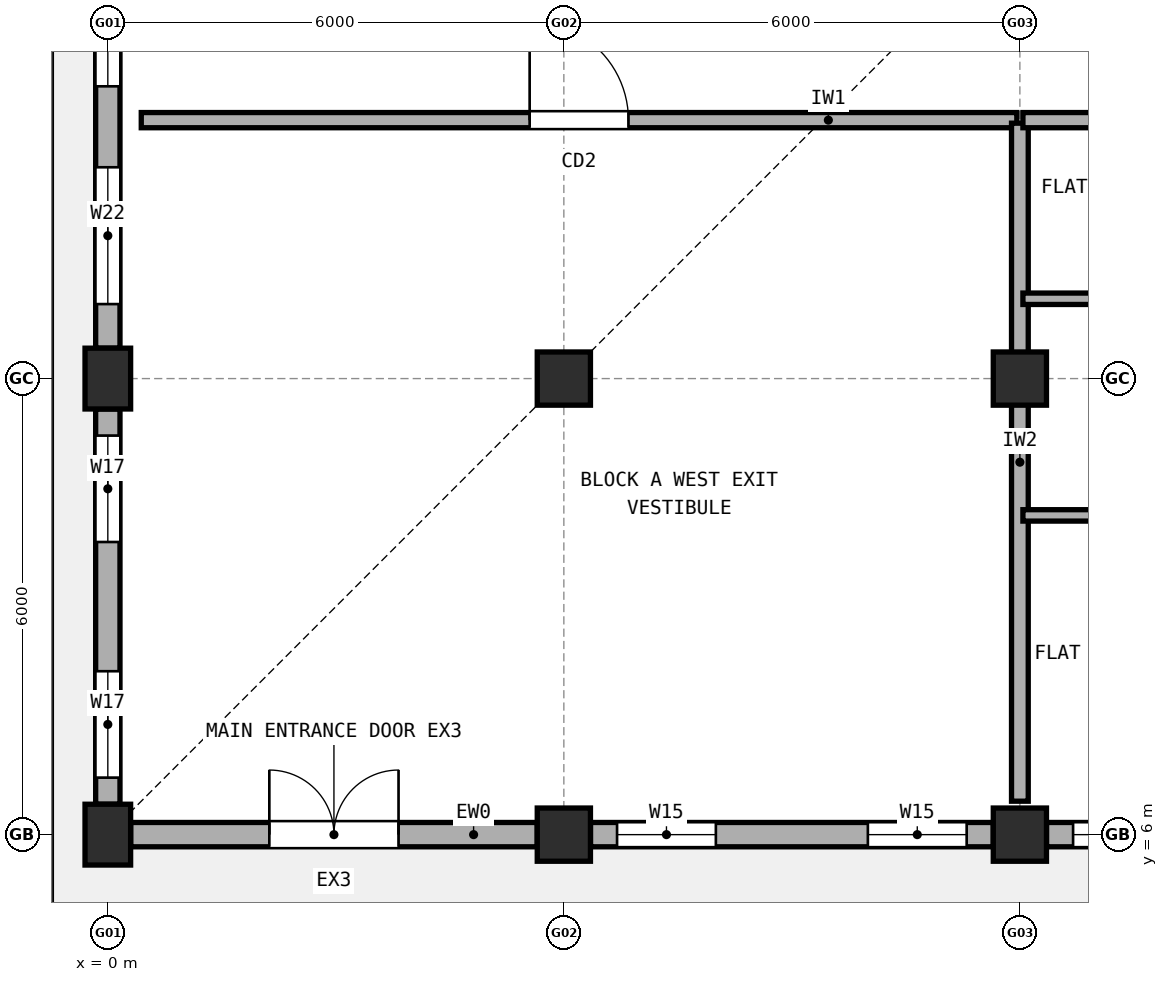
"""IFC4 building model, lengths in metres.
Left out: names, types, materials, properties, quantities, classifications, styles, units other than length and angle.
Written with IfcOpenShell. Run it as: python <this file> out.ifc"""

import sys

from ifc_helpers import new_model, si_unit, direction, frame, frame_2d, origin, origin_2d, place, context, subcontext, project, spatial, rectangle, extrude, element, fill, save


model = new_model("IFC4")
c1 = context("Model", 3, precision=1e-05, world=origin(), true_north=direction((0.0, 1.0)))
c2 = subcontext(c1, "Body", "Model", "MODEL_VIEW")
j1 = project(units=[si_unit("LENGTHUNIT", "METRE"), si_unit("PLANEANGLEUNIT", "RADIAN")], contexts=[c1])
p1 = place(None, origin())
s1 = spatial("IfcSite", under=j1, at=p1, CompositionType="ELEMENT")
p2 = place(p1, origin())
s2 = spatial("IfcBuilding", under=s1, at=p2, CompositionType="ELEMENT")
p3 = place(p2, origin())
s3 = spatial("IfcBuildingStorey", under=s2, at=p3, CompositionType="ELEMENT", Elevation=0.0)
for number, where, z_axis, x_axis in (
    (1, (0.0, 6.0, 0.0), (0.0, 0.0, 1.0), (1.0, 0.0, 0.0)),
    (2, (0.0, 12.0, 0.0), (0.0, 0.0, 1.0), (1.0, 0.0, 0.0)),
):
    element("IfcColumn", number, at=place(p3, frame(where, z_axis=z_axis, x_axis=x_axis)), inside=s3, PredefinedType="COLUMN", context=c2, shape_type="SweptSolid", body=[
        extrude(rectangle(XDim=0.6, YDim=0.8, at=origin_2d()), origin(), (0.0, 0.0, 1.0), 4.23),
    ])
for number, where, z_axis, x_axis in (
    (3, (6.0, 6.0, 0.0), (0.0, 0.0, 1.0), (1.0, 0.0, 0.0)),
    (4, (6.0, 12.0, 0.0), (0.0, 0.0, 1.0), (1.0, 0.0, 0.0)),
    (5, (12.0, 6.0, 0.0), (0.0, 0.0, 1.0), (1.0, 0.0, 0.0)),
    (6, (12.0, 12.0, 0.0), (0.0, 0.0, 1.0), (1.0, 0.0, 0.0)),
):
    element("IfcColumn", number, at=place(p3, frame(where, z_axis=z_axis, x_axis=x_axis)), inside=s3, PredefinedType="COLUMN", context=c2, shape_type="SweptSolid", body=[
        extrude(rectangle(XDim=0.7, YDim=0.7, at=origin_2d()), origin(), (0.0, 0.0, 1.0), 4.23),
    ])
p4 = place(p3, frame((0.3, 6.0, 0.0), z_axis=(0.0, 0.0, 1.0), x_axis=(1.0, 0.0, 0.0)))
e7 = element("IfcWall", 7, at=p4, inside=s3, PredefinedType="STANDARD", context=c2, shape_type="SweptSolid", body=[
    extrude(rectangle(XDim=5.35, YDim=0.32, at=frame_2d((2.675, 0.0))), origin(), (0.0, 0.0, 1.0), 3.112),
])
p5 = place(p4, frame((1.825, 0.0, 0.0)))
e8 = element("IfcOpeningElement", 8, at=p5, cuts=e7, PredefinedType="OPENING", context=c2, shape_type="SweptSolid", body=[
    extrude(rectangle(XDim=1.7, YDim=2.2, at=frame_2d((0.85, 1.1))), frame((0.0, 0.17, 0.0), z_axis=(0.0, -1.0, 0.0), x_axis=(1.0, 0.0, 0.0)), (0.0, 0.0, 1.0), 0.34),
])
p6 = place(p3, frame((6.35, 6.0, 0.0), z_axis=(0.0, 0.0, 1.0), x_axis=(1.0, 0.0, 0.0)))
e9 = element("IfcWall", 9, at=p6, inside=s3, PredefinedType="STANDARD", context=c2, shape_type="SweptSolid", body=[
    extrude(rectangle(XDim=5.3, YDim=0.32, at=frame_2d((2.65, 0.0))), origin(), (0.0, 0.0, 1.0), 3.112),
])
p7 = place(p6, frame((0.35, 0.0, 0.9)))
e10 = element("IfcOpeningElement", 10, at=p7, cuts=e9, PredefinedType="OPENING", context=c2, shape_type="SweptSolid", body=[
    extrude(rectangle(XDim=1.3, YDim=1.45, at=frame_2d((0.65, 0.725))), frame((0.0, 0.17, 0.0), z_axis=(0.0, -1.0, 0.0), x_axis=(1.0, 0.0, 0.0)), (0.0, 0.0, 1.0), 0.34),
])
p8 = place(p6, frame((3.65, 0.0, 0.9)))
e11 = element("IfcOpeningElement", 11, at=p8, cuts=e9, PredefinedType="OPENING", context=c2, shape_type="SweptSolid", body=[
    extrude(rectangle(XDim=1.3, YDim=1.45, at=frame_2d((0.65, 0.725))), frame((0.0, 0.17, 0.0), z_axis=(0.0, -1.0, 0.0), x_axis=(1.0, 0.0, 0.0)), (0.0, 0.0, 1.0), 0.34),
])
p9 = place(p3, frame((12.35, 6.0, 0.0), z_axis=(0.0, 0.0, 1.0), x_axis=(1.0, 0.0, 0.0)))
e12 = element("IfcWall", 12, at=p9, inside=s3, PredefinedType="STANDARD", context=c2, shape_type="SweptSolid", body=[
    extrude(rectangle(XDim=5.3, YDim=0.32, at=frame_2d((2.65, 0.0))), origin(), (0.0, 0.0, 1.0), 3.112),
])
p10 = place(p9, frame((0.35, 0.0, 0.9)))
e13 = element("IfcOpeningElement", 13, at=p10, cuts=e12, PredefinedType="OPENING", context=c2, shape_type="SweptSolid", body=[
    extrude(rectangle(XDim=1.4, YDim=1.5, at=frame_2d((0.7, 0.75))), frame((0.0, 0.17, 0.0), z_axis=(0.0, -1.0, 0.0), x_axis=(1.0, 0.0, 0.0)), (0.0, 0.0, 1.0), 0.34),
])
p11 = place(p9, frame((2.36, 0.0, 0.9)))
e14 = element("IfcOpeningElement", 14, at=p11, cuts=e12, PredefinedType="OPENING", context=c2, shape_type="SweptSolid", body=[
    extrude(rectangle(XDim=1.4, YDim=1.5, at=frame_2d((0.7, 0.75))), frame((0.0, 0.17, 0.0), z_axis=(0.0, -1.0, 0.0), x_axis=(1.0, 0.0, 0.0)), (0.0, 0.0, 1.0), 0.34),
])
p12 = place(p3, frame((0.0, 17.6, 0.0), z_axis=(0.0, 0.0, 1.0), x_axis=(0.0, -1.0, 0.0)))
e15 = element("IfcWall", 15, at=p12, inside=s3, PredefinedType="STANDARD", context=c2, shape_type="SweptSolid", body=[
    extrude(rectangle(XDim=5.2, YDim=0.32, at=frame_2d((2.6, 0.0))), origin(), (0.0, 0.0, 1.0), 3.712),
])
p13 = place(p12, frame((0.405, 0.0, 0.9)))
e16 = element("IfcOpeningElement", 16, at=p13, cuts=e15, PredefinedType="OPENING", context=c2, shape_type="SweptSolid", body=[
    extrude(rectangle(XDim=1.35, YDim=1.5, at=frame_2d((0.675, 0.75))), frame((0.0, 0.17, 0.0), z_axis=(0.0, -1.0, 0.0), x_axis=(1.0, 0.0, 0.0)), (0.0, 0.0, 1.0), 0.34),
])
p14 = place(p12, frame((2.82, 0.0, 0.9)))
e17 = element("IfcOpeningElement", 17, at=p14, cuts=e15, PredefinedType="OPENING", context=c2, shape_type="SweptSolid", body=[
    extrude(rectangle(XDim=1.8, YDim=1.45, at=frame_2d((0.9, 0.725))), frame((0.0, 0.17, 0.0), z_axis=(0.0, -1.0, 0.0), x_axis=(1.0, 0.0, 0.0)), (0.0, 0.0, 1.0), 0.34),
])
p15 = place(p3, frame((0.0, 11.6, 0.0), z_axis=(0.0, 0.0, 1.0), x_axis=(0.0, -1.0, 0.0)))
e18 = element("IfcWall", 18, at=p15, inside=s3, PredefinedType="STANDARD", context=c2, shape_type="SweptSolid", body=[
    extrude(rectangle(XDim=5.2, YDim=0.32, at=frame_2d((2.6, 0.0))), origin(), (0.0, 0.0, 1.0), 3.712),
])
p16 = place(p15, frame((0.35, 0.0, 0.9)))
e19 = element("IfcOpeningElement", 19, at=p16, cuts=e18, PredefinedType="OPENING", context=c2, shape_type="SweptSolid", body=[
    extrude(rectangle(XDim=1.4, YDim=1.5, at=frame_2d((0.7, 0.75))), frame((0.0, 0.17, 0.0), z_axis=(0.0, -1.0, 0.0), x_axis=(1.0, 0.0, 0.0)), (0.0, 0.0, 1.0), 0.34),
])
p17 = place(p15, frame((3.45, 0.0, 0.9)))
e20 = element("IfcOpeningElement", 20, at=p17, cuts=e18, PredefinedType="OPENING", context=c2, shape_type="SweptSolid", body=[
    extrude(rectangle(XDim=1.4, YDim=1.5, at=frame_2d((0.7, 0.75))), frame((0.0, 0.17, 0.0), z_axis=(0.0, -1.0, 0.0), x_axis=(1.0, 0.0, 0.0)), (0.0, 0.0, 1.0), 0.34),
])
p18 = place(p3, frame((0.44, 15.4, 0.0), z_axis=(0.0, 0.0, 1.0), x_axis=(1.0, 0.0, 0.0)))
e21 = element("IfcWall", 21, at=p18, inside=s3, PredefinedType="SOLIDWALL", context=c2, shape_type="SweptSolid", body=[
    extrude(rectangle(XDim=11.52, YDim=0.2, at=frame_2d((5.76, 0.0))), origin(), (0.0, 0.0, 1.0), 3.612),
])
p19 = place(p18, frame((5.11, 0.0, 0.0)))
e22 = element("IfcOpeningElement", 22, at=p19, cuts=e21, PredefinedType="OPENING", context=c2, shape_type="SweptSolid", body=[
    extrude(rectangle(XDim=1.3, YDim=2.15, at=frame_2d((0.65, 1.075))), frame((0.0, 0.11, 0.0), z_axis=(0.0, -1.0, 0.0), x_axis=(1.0, 0.0, 0.0)), (0.0, 0.0, 1.0), 0.22),
])
p20 = place(p3, frame((12.0, 6.44, 0.0), z_axis=(0.0, 0.0, 1.0), x_axis=(0.0, 1.0, 0.0)))
e23 = element("IfcWall", 23, at=p20, inside=s3, PredefinedType="SOLIDWALL", context=c2, shape_type="SweptSolid", body=[
    extrude(rectangle(XDim=8.92, YDim=0.22, at=frame_2d((4.46, 0.0))), origin(), (0.0, 0.0, 1.0), 3.612),
])
p21 = place(p3, frame((12.04, 15.4, 0.0), z_axis=(0.0, 0.0, 1.0), x_axis=(1.0, 0.0, 0.0)))
e24 = element("IfcWall", 24, at=p21, inside=s3, PredefinedType="SOLIDWALL", context=c2, shape_type="SweptSolid", body=[
    extrude(rectangle(XDim=4.42, YDim=0.2, at=frame_2d((2.21, 0.0))), origin(), (0.0, 0.0, 1.0), 3.612),
])
for number, where, z_axis, x_axis in (
    (25, (12.04, 10.2, 0.0), (0.0, 0.0, 1.0), (1.0, 0.0, 0.0)),
    (26, (12.04, 13.05, 0.0), (0.0, 0.0, 1.0), (1.0, 0.0, 0.0)),
):
    element("IfcWall", number, at=place(p3, frame(where, z_axis=z_axis, x_axis=x_axis)), inside=s3, PredefinedType="PARTITIONING", context=c2, shape_type="SweptSolid", body=[
        extrude(rectangle(XDim=4.42, YDim=0.15, at=frame_2d((2.21, 0.0))), origin(), (0.0, 0.0, 1.0), 3.612),
    ])
p22 = place(p5, frame((1.7, 0.0, 0.0), z_axis=(0.0, 0.0, 1.0), x_axis=(-1.0, 0.0, 0.0)))
e27 = element("IfcDoor", 27, at=p22, inside=s3, OperationType="DOUBLE_DOOR_SINGLE_SWING", PredefinedType="DOOR", context=c2, shape_type="SweptSolid", body=[
    extrude(rectangle(XDim=1.7, YDim=2.2, at=frame_2d((0.85, 1.1))), frame((0.0, 0.025, 0.0), z_axis=(0.0, -1.0, 0.0), x_axis=(1.0, 0.0, 0.0)), (0.0, 0.0, 1.0), 0.05),
])
fill(e8, e27)
p23 = place(p7, origin())
e28 = element("IfcWindow", 28, at=p23, inside=s3, PartitioningType="SINGLE_PANEL", PredefinedType="WINDOW", context=c2, shape_type="SweptSolid", body=[
    extrude(rectangle(XDim=1.3, YDim=1.45, at=frame_2d((0.65, 0.725))), frame((0.0, 0.03, 0.0), z_axis=(0.0, -1.0, 0.0), x_axis=(1.0, 0.0, 0.0)), (0.0, 0.0, 1.0), 0.06),
])
fill(e10, e28)
p24 = place(p8, origin())
e29 = element("IfcWindow", 29, at=p24, inside=s3, PartitioningType="SINGLE_PANEL", PredefinedType="WINDOW", context=c2, shape_type="SweptSolid", body=[
    extrude(rectangle(XDim=1.3, YDim=1.45, at=frame_2d((0.65, 0.725))), frame((0.0, 0.03, 0.0), z_axis=(0.0, -1.0, 0.0), x_axis=(1.0, 0.0, 0.0)), (0.0, 0.0, 1.0), 0.06),
])
fill(e11, e29)
p25 = place(p10, origin())
e30 = element("IfcWindow", 30, at=p25, inside=s3, PartitioningType="SINGLE_PANEL", PredefinedType="WINDOW", context=c2, shape_type="SweptSolid", body=[
    extrude(rectangle(XDim=1.4, YDim=1.5, at=frame_2d((0.7, 0.75))), frame((0.0, 0.03, 0.0), z_axis=(0.0, -1.0, 0.0), x_axis=(1.0, 0.0, 0.0)), (0.0, 0.0, 1.0), 0.06),
])
fill(e13, e30)
p26 = place(p13, origin())
e31 = element("IfcWindow", 31, at=p26, inside=s3, PartitioningType="SINGLE_PANEL", PredefinedType="WINDOW", context=c2, shape_type="SweptSolid", body=[
    extrude(rectangle(XDim=1.35, YDim=1.5, at=frame_2d((0.675, 0.75))), frame((0.0, 0.03, 0.0), z_axis=(0.0, -1.0, 0.0), x_axis=(1.0, 0.0, 0.0)), (0.0, 0.0, 1.0), 0.06),
])
fill(e16, e31)
p27 = place(p14, origin())
e32 = element("IfcWindow", 32, at=p27, inside=s3, PartitioningType="SINGLE_PANEL", PredefinedType="WINDOW", context=c2, shape_type="SweptSolid", body=[
    extrude(rectangle(XDim=1.8, YDim=1.45, at=frame_2d((0.9, 0.725))), frame((0.0, 0.03, 0.0), z_axis=(0.0, -1.0, 0.0), x_axis=(1.0, 0.0, 0.0)), (0.0, 0.0, 1.0), 0.06),
])
fill(e17, e32)
p28 = place(p16, origin())
e33 = element("IfcWindow", 33, at=p28, inside=s3, PartitioningType="SINGLE_PANEL", PredefinedType="WINDOW", context=c2, shape_type="SweptSolid", body=[
    extrude(rectangle(XDim=1.4, YDim=1.5, at=frame_2d((0.7, 0.75))), frame((0.0, 0.03, 0.0), z_axis=(0.0, -1.0, 0.0), x_axis=(1.0, 0.0, 0.0)), (0.0, 0.0, 1.0), 0.06),
])
fill(e19, e33)
p29 = place(p17, origin())
e34 = element("IfcWindow", 34, at=p29, inside=s3, PartitioningType="SINGLE_PANEL", PredefinedType="WINDOW", context=c2, shape_type="SweptSolid", body=[
    extrude(rectangle(XDim=1.4, YDim=1.5, at=frame_2d((0.7, 0.75))), frame((0.0, 0.03, 0.0), z_axis=(0.0, -1.0, 0.0), x_axis=(1.0, 0.0, 0.0)), (0.0, 0.0, 1.0), 0.06),
])
fill(e20, e34)
p30 = place(p19, origin())
e35 = element("IfcDoor", 35, at=p30, inside=s3, OperationType="SINGLE_SWING_LEFT", PredefinedType="DOOR", context=c2, shape_type="SweptSolid", body=[
    extrude(rectangle(XDim=1.3, YDim=2.15, at=frame_2d((0.65, 1.075))), frame((0.0, 0.025, 0.0), z_axis=(0.0, -1.0, 0.0), x_axis=(1.0, 0.0, 0.0)), (0.0, 0.0, 1.0), 0.05),
])
fill(e22, e35)
save(model, sys.argv[1])
